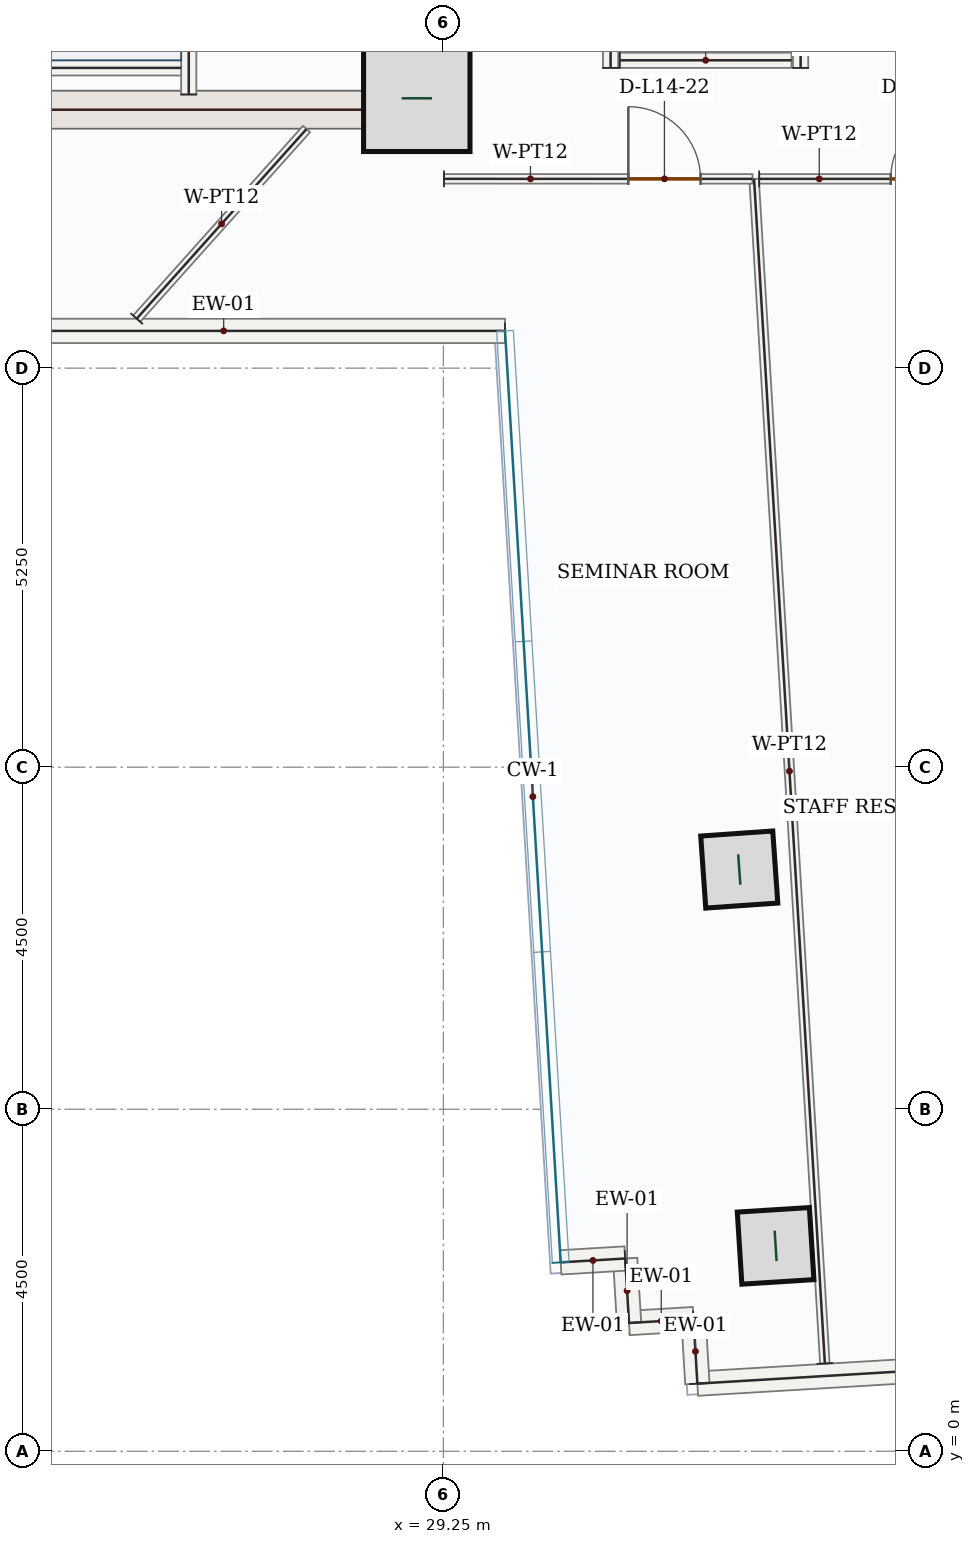
"""IFC4 building model, lengths in metres.
Left out: names, types, materials, properties, quantities, classifications, styles, units other than length and angle.
Written with IfcOpenShell. Run it as: python <this file> out.ifc"""

import sys

from ifc_helpers import new_model, si_unit, direction, frame, frame_2d, origin, origin_2d, place, context, subcontext, project, spatial, rectangle, hollow_rectangle, extrude, source, transform, mapped, element, fill, save


model = new_model("IFC4")
c1 = context("Model", 3, precision=1e-05, world=origin(), true_north=direction((0.0, 1.0)))
c2 = subcontext(c1, "Body", "Model", "MODEL_VIEW")
j1 = project(units=[si_unit("LENGTHUNIT", "METRE"), si_unit("PLANEANGLEUNIT", "RADIAN")], contexts=[c1])
p1 = place(None, origin())
s1 = spatial("IfcSite", under=j1, at=p1, CompositionType="ELEMENT")
p2 = place(p1, origin())
s2 = spatial("IfcBuilding", under=s1, at=p2, CompositionType="ELEMENT")
p3 = place(p2, frame((0.0, 0.0, 66.9)))
s3 = spatial("IfcBuildingStorey", under=s2, at=p3, CompositionType="ELEMENT", Elevation=66.9)
p4 = place(p3, frame((29.0, 17.4, 0.0), z_axis=(0.0, 0.0, 1.0), x_axis=(0.0, 1.0, 0.0)))
e1 = element("IfcWall", 1, at=p4, inside=s3, PredefinedType="SHEAR", context=c2, shape_type="SweptSolid", body=[
    extrude(rectangle(XDim=8.55, YDim=0.5, at=frame_2d((4.275, 0.0))), origin(), (0.0, 0.0, 1.0), 3.95),
])
p5 = place(p4, frame((6.65, 0.0, 0.0)))
e2 = element("IfcOpeningElement", 2, at=p5, cuts=e1, PredefinedType="OPENING", context=c2, shape_type="SweptSolid", body=[
    extrude(rectangle(XDim=1.1, YDim=2.2, at=frame_2d((0.55, 1.1))), frame((0.0, 0.26, 0.0), z_axis=(0.0, -1.0, 0.0), x_axis=(1.0, 0.0, 0.0)), (0.0, 0.0, 1.0), 0.52),
])
p6 = place(p4, frame((3.15, 0.0, 0.0)))
e3 = element("IfcOpeningElement", 3, at=p6, cuts=e1, PredefinedType="OPENING", context=c2, shape_type="SweptSolid", body=[
    extrude(rectangle(XDim=0.88, YDim=2.1, at=frame_2d((0.44, 1.05))), frame((0.0, 0.26, 0.0), z_axis=(0.0, -1.0, 0.0), x_axis=(1.0, 0.0, 0.0)), (0.0, 0.0, 1.0), 0.52),
])
m1 = source(origin(), c2, "Body", "SweptSolid", [
    extrude(rectangle(XDim=7.0, YDim=0.5, at=frame_2d((3.5, 0.0))), origin(), (0.0, 0.0, 1.0), 3.95),
])
p7 = place(p3, frame((21.75, 17.65, 0.0), z_axis=(0.0, 0.0, 1.0), x_axis=(1.0, 0.0, 0.0)))
e4 = element("IfcWall", 4, at=p7, inside=s3, PredefinedType="SHEAR", context=c2, shape_type="MappedRepresentation", body=[
    mapped(m1, transform((0.0, 0.0, 0.0), x_axis=(1.0, 0.0, 0.0), y_axis=(0.0, 1.0, 0.0), z_axis=(0.0, 0.0, 1.0), scale=1.0)),
])
m2 = source(origin(), c2, "Body", "SweptSolid", [
    extrude(rectangle(XDim=1.4, YDim=1.4, at=origin_2d()), origin(), (0.0, 0.0, 1.0), 4.2),
])
p8 = place(p3, frame((28.9, 17.8, 0.0), z_axis=(0.0, 0.0, 1.0), x_axis=(1.0, 0.0, 0.0)))
e5 = element("IfcColumn", 5, at=p8, inside=s3, PredefinedType="COLUMN", context=c2, shape_type="MappedRepresentation", body=[
    mapped(m2, transform((0.0, 0.0, 0.0), x_axis=(1.0, 0.0, 0.0), y_axis=(0.0, 1.0, 0.0), z_axis=(0.0, 0.0, 1.0), scale=1.0)),
])
m3 = source(origin(), c2, "Body", "SweptSolid", [
    extrude(hollow_rectangle(XDim=0.95, YDim=0.95, WallThickness=0.05, at=origin_2d()), origin(), (0.0, 0.0, 1.0), 4.2),
])
for number, where, z_axis, x_axis in (
    (6, (33.143, 7.654, 0.0), (0.0, 0.0, 1.0), (-0.07, 0.998, 0.0)),
    (7, (33.621, 2.703, 0.0), (0.0, 0.0, 1.0), (-0.063, 0.998, 0.0)),
):
    element("IfcColumn", number, at=place(p3, frame(where, z_axis=z_axis, x_axis=x_axis)), inside=s3, PredefinedType="COLUMN", context=c2, shape_type="MappedRepresentation", body=[
        mapped(m3, transform((0.0, 0.0, 0.0), x_axis=(1.0, 0.0, 0.0), y_axis=(0.0, 1.0, 0.0), z_axis=(0.0, 0.0, 1.0), scale=1.0)),
    ])
m4 = source(origin(), c2, "Body", "SweptSolid", [
    extrude(rectangle(XDim=9.92, YDim=0.32, at=frame_2d((4.96, 0.0))), origin(), (0.0, 0.0, 1.0), 3.95),
])
p9 = place(p3, frame((42.494, 1.482, 0.0), z_axis=(0.0, 0.0, 1.0), x_axis=(-0.998218942745, -0.059656871726, 0.0)))
e8 = element("IfcWall", 8, at=p9, inside=s3, PredefinedType="SOLIDWALL", context=c2, shape_type="MappedRepresentation", body=[
    mapped(m4, transform((0.0, 0.0, 0.0), x_axis=(1.0, 0.0, 0.0), y_axis=(0.0, 1.0, 0.0), z_axis=(0.0, 0.0, 1.0), scale=1.0)),
])
m5 = source(origin(), c2, "Body", "SweptSolid", [
    extrude(rectangle(XDim=0.85, YDim=0.32, at=frame_2d((0.425, 0.0))), origin(), (0.0, 0.0, 1.0), 3.95),
])
p10 = place(p3, frame((32.592, 0.89, 0.0), z_axis=(0.0, 0.0, 1.0), x_axis=(-0.059732049764, 0.998214447016, 0.0)))
e9 = element("IfcWall", 9, at=p10, inside=s3, PredefinedType="SOLIDWALL", context=c2, shape_type="MappedRepresentation", body=[
    mapped(m5, transform((0.0, 0.0, 0.0), x_axis=(1.0, 0.0, 0.0), y_axis=(0.0, 1.0, 0.0), z_axis=(0.0, 0.0, 1.0), scale=1.0)),
])
m6 = source(origin(), c2, "Body", "SweptSolid", [
    extrude(rectangle(XDim=0.85, YDim=0.32, at=frame_2d((0.425, 0.0))), origin(), (0.0, 0.0, 1.0), 3.95),
])
for number, where, z_axis, x_axis in (
    (10, (32.541, 1.739, 0.0), (0.0, 0.0, 1.0), (-0.998, -0.06, 0.0)),
    (11, (31.692, 1.688, 0.0), (0.0, 0.0, 1.0), (-0.06, 0.998, 0.0)),
    (12, (31.642, 2.536, 0.0), (0.0, 0.0, 1.0), (-0.998, -0.06, 0.0)),
):
    element("IfcWall", number, at=place(p3, frame(where, z_axis=z_axis, x_axis=x_axis)), inside=s3, PredefinedType="SOLIDWALL", context=c2, shape_type="MappedRepresentation", body=[
        mapped(m6, transform((0.0, 0.0, 0.0), x_axis=(1.0, 0.0, 0.0), y_axis=(0.0, 1.0, 0.0), z_axis=(0.0, 0.0, 1.0), scale=1.0)),
    ])
m7 = source(origin(), c2, "Body", "SweptSolid", [
    extrude(rectangle(XDim=7.403, YDim=0.32, at=frame_2d((3.701, 0.0))), origin(), (0.0, 0.0, 1.0), 3.95),
])
p11 = place(p3, frame((30.061, 14.74, 0.0), z_axis=(0.0, 0.0, 1.0), x_axis=(-1.0, 0.0, 0.0)))
e13 = element("IfcWall", 13, at=p11, inside=s3, PredefinedType="SOLIDWALL", context=c2, shape_type="MappedRepresentation", body=[
    mapped(m7, transform((0.0, 0.0, 0.0), x_axis=(1.0, 0.0, 0.0), y_axis=(0.0, 1.0, 0.0), z_axis=(0.0, 0.0, 1.0), scale=1.0)),
])
p12 = place(p3, frame((25.9, 17.85, 0.0), z_axis=(0.0, 0.0, 1.0), x_axis=(0.0, 1.0, 0.0)))
e14 = element("IfcWall", 14, at=p12, inside=s3, PredefinedType="SOLIDWALL", context=c2, shape_type="SweptSolid", body=[
    extrude(rectangle(XDim=8.0, YDim=0.2, at=frame_2d((4.0, 0.0))), origin(), (0.0, 0.0, 1.0), 3.95),
])
p13 = place(p12, frame((6.3, 0.0, 0.0)))
e15 = element("IfcOpeningElement", 15, at=p13, cuts=e14, PredefinedType="OPENING", context=c2, shape_type="SweptSolid", body=[
    extrude(rectangle(XDim=1.05, YDim=2.15, at=frame_2d((0.525, 1.075))), frame((0.0, 0.11, 0.0), z_axis=(0.0, -1.0, 0.0), x_axis=(1.0, 0.0, 0.0)), (0.0, 0.0, 1.0), 0.22),
])
m8 = source(origin(), c2, "Body", "SweptSolid", [
    extrude(rectangle(XDim=3.25, YDim=0.2, at=frame_2d((1.625, 0.0))), origin(), (0.0, 0.0, 1.0), 3.95),
])
p14 = place(p3, frame((22.55, 18.2, 0.0), z_axis=(0.0, 0.0, 1.0), x_axis=(1.0, 0.0, 0.0)))
e16 = element("IfcWall", 16, at=p14, inside=s3, PredefinedType="SOLIDWALL", context=c2, shape_type="MappedRepresentation", body=[
    mapped(m8, transform((0.0, 0.0, 0.0), x_axis=(1.0, 0.0, 0.0), y_axis=(0.0, 1.0, 0.0), z_axis=(0.0, 0.0, 1.0), scale=1.0)),
])
m9 = source(origin(), c2, "Body", "SweptSolid", [
    extrude(rectangle(XDim=2.35, YDim=0.2, at=frame_2d((1.175, 0.0))), origin(), (0.0, 0.0, 1.0), 3.95),
])
for number, where, z_axis, x_axis in (
    (17, (31.45, 18.2, 0.0), (0.0, 0.0, 1.0), (0.0, 1.0, 0.0)),
    (18, (33.95, 18.2, 0.0), (0.0, 0.0, 1.0), (0.0, 1.0, 0.0)),
):
    element("IfcWall", number, at=place(p3, frame(where, z_axis=z_axis, x_axis=x_axis)), inside=s3, PredefinedType="SOLIDWALL", context=c2, shape_type="MappedRepresentation", body=[
        mapped(m9, transform((0.0, 0.0, 0.0), x_axis=(1.0, 0.0, 0.0), y_axis=(0.0, 1.0, 0.0), z_axis=(0.0, 0.0, 1.0), scale=1.0)),
    ])
m10 = source(origin(), c2, "Body", "SweptSolid", [
    extrude(rectangle(XDim=2.26, YDim=0.2, at=frame_2d((1.13, 0.0))), origin(), (0.0, 0.0, 1.0), 3.95),
])
p15 = place(p3, frame((31.57, 18.3, 0.0), z_axis=(0.0, 0.0, 1.0), x_axis=(1.0, 0.0, 0.0)))
e19 = element("IfcWall", 19, at=p15, inside=s3, PredefinedType="SOLIDWALL", context=c2, shape_type="MappedRepresentation", body=[
    mapped(m10, transform((0.0, 0.0, 0.0), x_axis=(1.0, 0.0, 0.0), y_axis=(0.0, 1.0, 0.0), z_axis=(0.0, 0.0, 1.0), scale=1.0)),
])
m11 = source(origin(), c2, "Body", "SweptSolid", [
    extrude(rectangle(XDim=15.612, YDim=0.125, at=frame_2d((7.806, 0.0))), origin(), (0.0, 0.0, 1.0), 3.95),
])
p16 = place(p3, frame((34.269, 1.156, 0.0), z_axis=(0.0, 0.0, 1.0), x_axis=(-0.059658872533, 0.998218823169, 0.0)))
e20 = element("IfcWall", 20, at=p16, inside=s3, PredefinedType="PARTITIONING", context=c2, shape_type="MappedRepresentation", body=[
    mapped(m11, transform((0.0, 0.0, 0.0), x_axis=(1.0, 0.0, 0.0), y_axis=(0.0, 1.0, 0.0), z_axis=(0.0, 0.0, 1.0), scale=1.0)),
])
p17 = place(p3, frame((33.405, 16.74, 0.0), z_axis=(0.0, 0.0, 1.0), x_axis=(1.0, 0.0, 0.0)))
e21 = element("IfcWall", 21, at=p17, inside=s3, PredefinedType="PARTITIONING", context=c2, shape_type="SweptSolid", body=[
    extrude(rectangle(XDim=3.168, YDim=0.125, at=frame_2d((1.584, 0.0))), origin(), (0.0, 0.0, 1.0), 3.95),
])
p18 = place(p17, frame((1.73, 0.0, 0.0)))
e22 = element("IfcOpeningElement", 22, at=p18, cuts=e21, PredefinedType="OPENING", context=c2, shape_type="SweptSolid", body=[
    extrude(rectangle(XDim=0.95, YDim=2.15, at=frame_2d((0.475, 1.075))), frame((0.0, 0.073, 0.0), z_axis=(0.0, -1.0, 0.0), x_axis=(1.0, 0.0, 0.0)), (0.0, 0.0, 1.0), 0.145),
])
p19 = place(p3, frame((29.258, 16.74, 0.0), z_axis=(0.0, 0.0, 1.0), x_axis=(0.999999998192, -6.0135907e-05, 0.0)))
e23 = element("IfcWall", 23, at=p19, inside=s3, PredefinedType="PARTITIONING", context=c2, shape_type="SweptSolid", body=[
    extrude(rectangle(XDim=4.06, YDim=0.125, at=frame_2d((2.03, 0.0))), origin(), (0.0, 0.0, 1.0), 3.95),
])
p20 = place(p19, frame((2.426, 0.0, 0.0)))
e24 = element("IfcOpeningElement", 24, at=p20, cuts=e23, PredefinedType="OPENING", context=c2, shape_type="SweptSolid", body=[
    extrude(rectangle(XDim=0.95, YDim=2.15, at=frame_2d((0.475, 1.075))), frame((0.0, 0.073, 0.0), z_axis=(0.0, -1.0, 0.0), x_axis=(1.0, 0.0, 0.0)), (0.0, 0.0, 1.0), 0.145),
])
m12 = source(origin(), c2, "Body", "SweptSolid", [
    extrude(rectangle(XDim=3.348, YDim=0.125, at=frame_2d((1.674, 0.0))), origin(), (0.0, 0.0, 1.0), 3.95),
])
p21 = place(p3, frame((25.215, 14.901, 0.0), z_axis=(0.0, 0.0, 1.0), x_axis=(0.667206176518, 0.74487308853, 0.0)))
e25 = element("IfcWall", 25, at=p21, inside=s3, PredefinedType="PARTITIONING", context=c2, shape_type="MappedRepresentation", body=[
    mapped(m12, transform((0.0, 0.0, 0.0), x_axis=(1.0, 0.0, 0.0), y_axis=(0.0, 1.0, 0.0), z_axis=(0.0, 0.0, 1.0), scale=1.0)),
])
m13 = source(origin(), c2, "Body", "SweptSolid", [
    extrude(rectangle(XDim=0.95, YDim=2.15, at=frame_2d((0.475, 1.075))), frame((0.0, 0.025, 0.0), z_axis=(0.0, -1.0, 0.0), x_axis=(1.0, 0.0, 0.0)), (0.0, 0.0, 1.0), 0.05),
])
p22 = place(p20, origin())
e26 = element("IfcDoor", 26, at=p22, inside=s3, OperationType="SINGLE_SWING_LEFT", PredefinedType="DOOR", context=c2, shape_type="MappedRepresentation", body=[
    mapped(m13, transform((0.0, 0.0, 0.0), x_axis=(1.0, 0.0, 0.0), y_axis=(0.0, 1.0, 0.0), z_axis=(0.0, 0.0, 1.0), scale=1.0)),
])
fill(e24, e26)
p23 = place(p18, origin())
e27 = element("IfcDoor", 27, at=p23, inside=s3, OperationType="SINGLE_SWING_RIGHT", PredefinedType="DOOR", context=c2, shape_type="MappedRepresentation", body=[
    mapped(m13, transform((0.0, 0.0, 0.0), x_axis=(1.0, 0.0, 0.0), y_axis=(0.0, 1.0, 0.0), z_axis=(0.0, 0.0, 1.0), scale=1.0)),
])
fill(e22, e27)
save(model, sys.argv[1])
